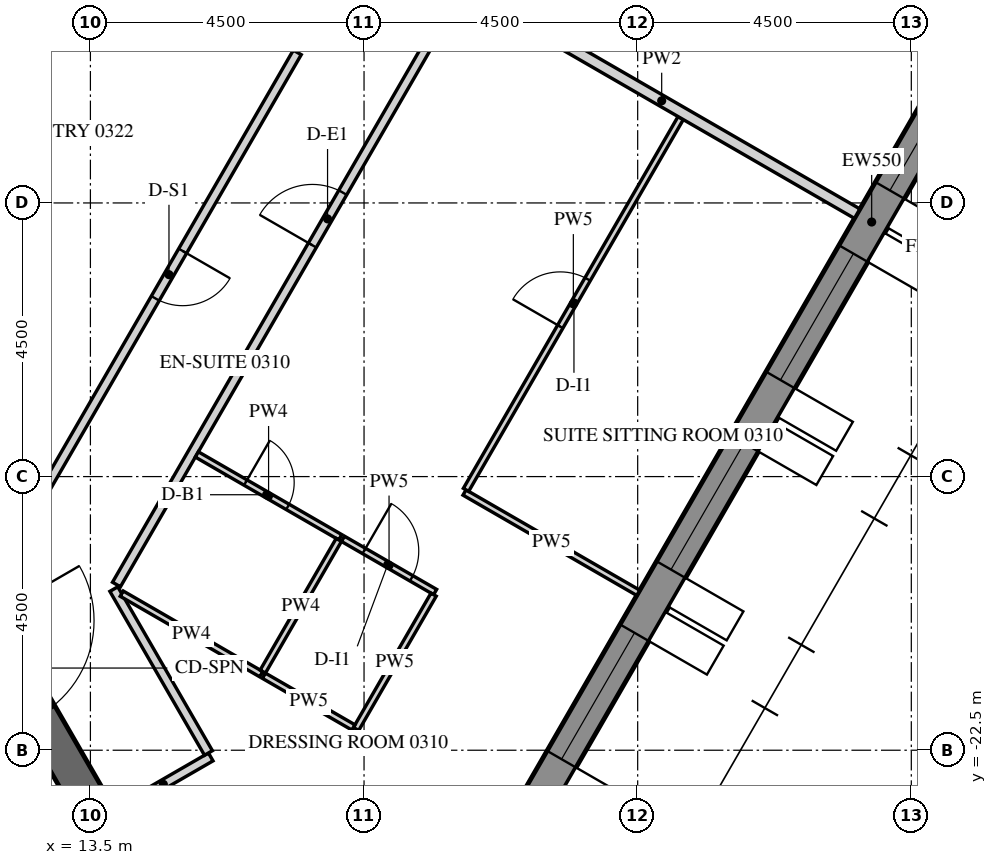
"""IFC4 building model, lengths in metres.
Left out: names, types, materials, properties, quantities, classifications, styles, units other than length and angle.
Written with IfcOpenShell. Run it as: python <this file> out.ifc"""

import sys

from ifc_helpers import new_model, si_unit, direction, frame, frame_2d, origin, place, context, subcontext, project, spatial, polyline, rectangle, outline, extrude, element, fill, save


model = new_model("IFC4")
c1 = context("Model", 3, precision=1e-05, world=origin(), true_north=direction((0.0, 1.0)))
c2 = subcontext(c1, "Body", "Model", "MODEL_VIEW")
j1 = project(units=[si_unit("LENGTHUNIT", "METRE"), si_unit("PLANEANGLEUNIT", "RADIAN")], contexts=[c1])
p1 = place(None, origin())
s1 = spatial("IfcSite", under=j1, at=p1, CompositionType="ELEMENT")
p2 = place(p1, origin())
s2 = spatial("IfcBuilding", under=s1, at=p2, CompositionType="ELEMENT")
p3 = place(p2, frame((0.0, 0.0, 60.9)))
s3 = spatial("IfcBuildingStorey", under=s2, at=p3, CompositionType="ELEMENT", Elevation=60.9)
p4 = place(p3, frame((18.83, -26.835, -0.15), z_axis=(0.0, 0.0, 1.0), x_axis=(0.500003800416, 0.866023209602, 0.0)))
e1 = element("IfcWall", 1, at=p4, inside=s3, PredefinedType="SOLIDWALL", context=c2, shape_type="SweptSolid", body=[
    extrude(outline(polyline([(-0.022, -0.275), (30.097, -0.275), (30.045, 0.275), (0.022, 0.275), (-0.022, -0.275)])), origin(), (0.0, 0.0, 1.0), 3.9),
])
p5 = place(p4, frame((1.236, 0.0, 1.05)))
e2 = element("IfcOpeningElement", 2, at=p5, cuts=e1, PredefinedType="OPENING", context=c2, shape_type="SweptSolid", body=[
    extrude(rectangle(XDim=2.4, YDim=2.4, at=frame_2d((1.2, 1.2))), frame((0.0, 0.285, 0.0), z_axis=(0.0, -1.0, 0.0), x_axis=(1.0, 0.0, 0.0)), (0.0, 0.0, 1.0), 0.57),
])
p6 = place(p4, frame((4.835, 0.0, 1.05)))
e3 = element("IfcOpeningElement", 3, at=p6, cuts=e1, PredefinedType="OPENING", context=c2, shape_type="SweptSolid", body=[
    extrude(rectangle(XDim=2.4, YDim=2.4, at=frame_2d((1.2, 1.2))), frame((0.0, 0.285, 0.0), z_axis=(0.0, -1.0, 0.0), x_axis=(1.0, 0.0, 0.0)), (0.0, 0.0, 1.0), 0.57),
])
p7 = place(p4, frame((8.436, 0.0, 1.05)))
e4 = element("IfcOpeningElement", 4, at=p7, cuts=e1, PredefinedType="OPENING", context=c2, shape_type="SweptSolid", body=[
    extrude(rectangle(XDim=2.4, YDim=2.4, at=frame_2d((1.2, 1.2))), frame((0.0, 0.285, 0.0), z_axis=(0.0, -1.0, 0.0), x_axis=(1.0, 0.0, 0.0)), (0.0, 0.0, 1.0), 0.57),
])
p8 = place(p4, frame((12.035, 0.0, 1.05)))
e5 = element("IfcOpeningElement", 5, at=p8, cuts=e1, PredefinedType="OPENING", context=c2, shape_type="SweptSolid", body=[
    extrude(rectangle(XDim=2.4, YDim=2.4, at=frame_2d((1.2, 1.2))), frame((0.0, 0.285, 0.0), z_axis=(0.0, -1.0, 0.0), x_axis=(1.0, 0.0, 0.0)), (0.0, 0.0, 1.0), 0.57),
])
p9 = place(p4, frame((15.635, 0.0, 1.05)))
e6 = element("IfcOpeningElement", 6, at=p9, cuts=e1, PredefinedType="OPENING", context=c2, shape_type="SweptSolid", body=[
    extrude(rectangle(XDim=2.4, YDim=2.4, at=frame_2d((1.2, 1.2))), frame((0.0, 0.285, 0.0), z_axis=(0.0, -1.0, 0.0), x_axis=(1.0, 0.0, 0.0)), (0.0, 0.0, 1.0), 0.57),
])
p10 = place(p4, frame((19.236, 0.0, 1.05)))
e7 = element("IfcOpeningElement", 7, at=p10, cuts=e1, PredefinedType="OPENING", context=c2, shape_type="SweptSolid", body=[
    extrude(rectangle(XDim=2.4, YDim=2.4, at=frame_2d((1.2, 1.2))), frame((0.0, 0.285, 0.0), z_axis=(0.0, -1.0, 0.0), x_axis=(1.0, 0.0, 0.0)), (0.0, 0.0, 1.0), 0.57),
])
p11 = place(p4, frame((22.835, 0.0, 1.05)))
e8 = element("IfcOpeningElement", 8, at=p11, cuts=e1, PredefinedType="OPENING", context=c2, shape_type="SweptSolid", body=[
    extrude(rectangle(XDim=2.4, YDim=2.4, at=frame_2d((1.2, 1.2))), frame((0.0, 0.285, 0.0), z_axis=(0.0, -1.0, 0.0), x_axis=(1.0, 0.0, 0.0)), (0.0, 0.0, 1.0), 0.57),
])
p12 = place(p4, frame((26.436, 0.0, 1.05)))
e9 = element("IfcOpeningElement", 9, at=p12, cuts=e1, PredefinedType="OPENING", context=c2, shape_type="SweptSolid", body=[
    extrude(rectangle(XDim=2.4, YDim=2.4, at=frame_2d((1.2, 1.2))), frame((0.0, 0.285, 0.0), z_axis=(0.0, -1.0, 0.0), x_axis=(1.0, 0.0, 0.0)), (0.0, 0.0, 1.0), 0.57),
])
p13 = place(p3, frame((7.91, -13.7, -0.15), z_axis=(0.0, 0.0, 1.0), x_axis=(0.499999880136, 0.866025472988, 0.0)))
e10 = element("IfcWall", 10, at=p13, inside=s3, PredefinedType="SHEAR", context=c2, shape_type="SweptSolid", body=[
    extrude(outline(polyline([(-0.173, -0.3), (15.993, -0.3), (15.646, 0.3), (0.173, 0.3), (-0.173, -0.3)])), origin(), (0.0, 0.0, 1.0), 3.9),
])
p14 = place(p13, frame((7.039, 0.0, 0.15)))
e11 = element("IfcOpeningElement", 11, at=p14, cuts=e10, PredefinedType="OPENING", context=c2, shape_type="SweptSolid", body=[
    extrude(rectangle(XDim=1.8, YDim=2.4, at=frame_2d((0.9, 1.2))), frame((0.0, 0.31, 0.0), z_axis=(0.0, -1.0, 0.0), x_axis=(1.0, 0.0, 0.0)), (0.0, 0.0, 1.0), 0.62),
])
p15 = place(p3, frame((8.083, -14.0, -0.15), z_axis=(0.0, 0.0, 1.0), x_axis=(0.499997680643, -0.866026742862, 0.0)))
e12 = element("IfcWall", 12, at=p15, inside=s3, PredefinedType="SHEAR", context=c2, shape_type="SweptSolid", body=[
    extrude(rectangle(XDim=16.509, YDim=0.6, at=frame_2d((8.254, 0.0))), origin(), (0.0, 0.0, 1.0), 3.9),
])
p16 = place(p15, frame((7.354, 0.0, 0.15)))
e13 = element("IfcOpeningElement", 13, at=p16, cuts=e12, PredefinedType="OPENING", context=c2, shape_type="SweptSolid", body=[
    extrude(rectangle(XDim=1.8, YDim=2.4, at=frame_2d((0.9, 1.2))), frame((0.0, 0.31, 0.0), z_axis=(0.0, -1.0, 0.0), x_axis=(1.0, 0.0, 0.0)), (0.0, 0.0, 1.0), 0.62),
])
p17 = place(p3, frame((13.92, -23.51, 0.0), z_axis=(0.0, 0.0, 1.0), x_axis=(0.866047807691, 0.499961193289, 0.0)))
e14 = element("IfcWall", 14, at=p17, inside=s3, PredefinedType="PARTITIONING", context=c2, shape_type="SweptSolid", body=[
    extrude(rectangle(XDim=1.8, YDim=0.15, at=frame_2d((0.9, 0.0))), origin(), (0.0, 0.0, 1.0), 2.988),
])
p18 = place(p3, frame((15.441, -22.545, 0.0), z_axis=(0.0, 0.0, 1.0), x_axis=(-0.500037089193, 0.86600398927, 0.0)))
e15 = element("IfcWall", 15, at=p18, inside=s3, PredefinedType="PARTITIONING", context=c2, shape_type="SweptSolid", body=[
    extrude(rectangle(XDim=3.112, YDim=0.15, at=frame_2d((1.556, 0.0))), origin(), (0.0, 0.0, 1.0), 2.988),
])
p19 = place(p3, frame((13.928, -19.775, 0.0), z_axis=(0.0, 0.0, 1.0), x_axis=(0.50000450071, 0.866022805283, 0.0)))
e16 = element("IfcWall", 16, at=p19, inside=s3, PredefinedType="PARTITIONING", context=c2, shape_type="SweptSolid", body=[
    extrude(rectangle(XDim=23.877, YDim=0.15, at=frame_2d((11.938, 0.0))), origin(), (0.0, 0.0, 1.0), 2.988),
])
p20 = place(p19, frame((6.443, 0.0, 0.0)))
e17 = element("IfcOpeningElement", 17, at=p20, cuts=e16, PredefinedType="OPENING", context=c2, shape_type="SweptSolid", body=[
    extrude(rectangle(XDim=1.0, YDim=2.1, at=frame_2d((0.5, 1.05))), frame((0.0, 0.085, 0.0), z_axis=(0.0, -1.0, 0.0), x_axis=(1.0, 0.0, 0.0)), (0.0, 0.0, 1.0), 0.17),
])
p21 = place(p19, frame((14.972, 0.0, 0.0)))
e18 = element("IfcOpeningElement", 18, at=p21, cuts=e16, PredefinedType="OPENING", context=c2, shape_type="SweptSolid", body=[
    extrude(rectangle(XDim=1.0, YDim=2.1, at=frame_2d((0.5, 1.05))), frame((0.0, 0.085, 0.0), z_axis=(0.0, -1.0, 0.0), x_axis=(1.0, 0.0, 0.0)), (0.0, 0.0, 1.0), 0.17),
])
p22 = place(p3, frame((16.902, -11.024, 0.0), z_axis=(0.0, 0.0, 1.0), x_axis=(-0.499999527968, -0.866025676312, 0.0)))
e19 = element("IfcWall", 19, at=p22, inside=s3, PredefinedType="PARTITIONING", context=c2, shape_type="SweptSolid", body=[
    extrude(rectangle(XDim=8.441, YDim=0.15, at=frame_2d((4.22, 0.0))), origin(), (0.0, 0.0, 1.0), 2.988),
])
p23 = place(p22, frame((3.771, 0.0, 0.0)))
e20 = element("IfcOpeningElement", 20, at=p23, cuts=e19, PredefinedType="OPENING", context=c2, shape_type="SweptSolid", body=[
    extrude(rectangle(XDim=0.9, YDim=2.1, at=frame_2d((0.45, 1.05))), frame((0.0, 0.085, 0.0), z_axis=(0.0, -1.0, 0.0), x_axis=(1.0, 0.0, 0.0)), (0.0, 0.0, 1.0), 0.17),
])
p24 = place(p3, frame((16.31, -21.25, 0.0), z_axis=(0.0, 0.0, 1.0), x_axis=(-0.866029095148, 0.499993606316, 0.0)))
e21 = element("IfcWall", 21, at=p24, inside=s3, PredefinedType="PARTITIONING", context=c2, shape_type="SweptSolid", body=[
    extrude(rectangle(XDim=2.65, YDim=0.1, at=frame_2d((1.325, 0.0))), origin(), (0.0, 0.0, 1.0), 2.988),
])
p25 = place(p3, frame((15.25, -17.636, 0.0), z_axis=(0.0, 0.0, 1.0), x_axis=(0.866012511928, -0.500022328685, 0.0)))
e22 = element("IfcWall", 22, at=p25, inside=s3, PredefinedType="PARTITIONING", context=c2, shape_type="SweptSolid", body=[
    extrude(rectangle(XDim=2.725, YDim=0.1, at=frame_2d((1.363, 0.0))), origin(), (0.0, 0.0, 1.0), 2.988),
])
p26 = place(p25, frame((0.925, 0.0, 0.0)))
e23 = element("IfcOpeningElement", 23, at=p26, cuts=e22, PredefinedType="OPENING", context=c2, shape_type="SweptSolid", body=[
    extrude(rectangle(XDim=0.8, YDim=2.1, at=frame_2d((0.4, 1.05))), frame((0.0, 0.06, 0.0), z_axis=(0.0, -1.0, 0.0), x_axis=(1.0, 0.0, 0.0)), (0.0, 0.0, 1.0), 0.12),
])
p27 = place(p3, frame((17.654, -19.023, 0.0), z_axis=(0.0, 0.0, 1.0), x_axis=(0.866002029911, -0.500040482552, 0.0)))
e24 = element("IfcWall", 24, at=p27, inside=s3, PredefinedType="PARTITIONING", context=c2, shape_type="SweptSolid", body=[
    extrude(rectangle(XDim=1.75, YDim=0.1, at=frame_2d((0.875, 0.0))), origin(), (0.0, 0.0, 1.0), 2.988),
])
p28 = place(p27, frame((0.4, 0.0, 0.0)))
e25 = element("IfcOpeningElement", 25, at=p28, cuts=e24, PredefinedType="OPENING", context=c2, shape_type="SweptSolid", body=[
    extrude(rectangle(XDim=0.9, YDim=2.1, at=frame_2d((0.45, 1.05))), frame((0.0, 0.06, 0.0), z_axis=(0.0, -1.0, 0.0), x_axis=(1.0, 0.0, 0.0)), (0.0, 0.0, 1.0), 0.12),
])
p29 = place(p3, frame((19.144, -19.942, 0.0), z_axis=(0.0, 0.0, 1.0), x_axis=(-0.500062241894, -0.865989465428, 0.0)))
e26 = element("IfcWall", 26, at=p29, inside=s3, PredefinedType="PARTITIONING", context=c2, shape_type="SweptSolid", body=[
    extrude(rectangle(XDim=2.55, YDim=0.1, at=frame_2d((1.275, 0.0))), origin(), (0.0, 0.0, 1.0), 2.988),
])
p30 = place(p3, frame((17.826, -22.125, 0.0), z_axis=(0.0, 0.0, 1.0), x_axis=(-0.865989465428, 0.500062241894, 0.0)))
e27 = element("IfcWall", 27, at=p30, inside=s3, PredefinedType="PARTITIONING", context=c2, shape_type="SweptSolid", body=[
    extrude(rectangle(XDim=1.7, YDim=0.1, at=frame_2d((0.85, 0.0))), origin(), (0.0, 0.0, 1.0), 2.988),
])
p31 = place(p3, frame((22.51, -19.912, 0.0), z_axis=(0.0, 0.0, 1.0), x_axis=(-0.866008176907, 0.50002983664, 0.0)))
e28 = element("IfcWall", 28, at=p31, inside=s3, PredefinedType="PARTITIONING", context=c2, shape_type="SweptSolid", body=[
    extrude(rectangle(XDim=3.3, YDim=0.1, at=frame_2d((1.65, 0.0))), origin(), (0.0, 0.0, 1.0), 2.988),
])
p32 = place(p3, frame((19.677, -18.218, 0.0), z_axis=(0.0, 0.0, 1.0), x_axis=(0.500010820671, 0.866019156377, 0.0)))
e29 = element("IfcWall", 29, at=p32, inside=s3, PredefinedType="PARTITIONING", context=c2, shape_type="SweptSolid", body=[
    extrude(rectangle(XDim=7.06, YDim=0.1, at=frame_2d((3.53, 0.0))), origin(), (0.0, 0.0, 1.0), 2.988),
])
p33 = place(p32, frame((3.1, 0.0, 0.0)))
e30 = element("IfcOpeningElement", 30, at=p33, cuts=e29, PredefinedType="OPENING", context=c2, shape_type="SweptSolid", body=[
    extrude(rectangle(XDim=0.9, YDim=2.1, at=frame_2d((0.45, 1.05))), frame((0.0, 0.06, 0.0), z_axis=(0.0, -1.0, 0.0), x_axis=(1.0, 0.0, 0.0)), (0.0, 0.0, 1.0), 0.12),
])
p34 = place(p3, frame((26.11, -13.676, 0.0), z_axis=(0.0, 0.0, 1.0), x_axis=(-0.866014745021, 0.500018461065, 0.0)))
e31 = element("IfcWall", 31, at=p34, inside=s3, PredefinedType="PARTITIONING", context=c2, shape_type="SweptSolid", body=[
    extrude(rectangle(XDim=7.425, YDim=0.18, at=frame_2d((3.712, 0.0))), origin(), (0.0, 0.0, 1.0), 2.988),
])
p35 = place(p3, frame((16.335, -21.207, 0.0), z_axis=(0.0, 0.0, 1.0), x_axis=(0.500004234368, 0.866022959057, 0.0)))
e32 = element("IfcWall", 32, at=p35, inside=s3, PredefinedType="PARTITIONING", context=c2, shape_type="SweptSolid", body=[
    extrude(rectangle(XDim=2.5, YDim=0.1, at=frame_2d((1.25, 0.0))), origin(), (0.0, 0.0, 1.0), 2.988),
])
p36 = place(p6, frame((0.0, 0.205, 0.0)))
e33 = element("IfcWindow", 33, at=p36, inside=s3, PartitioningType="DOUBLE_PANEL_VERTICAL", PredefinedType="WINDOW", context=c2, shape_type="SweptSolid", body=[
    extrude(rectangle(XDim=2.4, YDim=2.4, at=frame_2d((1.2, 1.2))), frame((0.0, 0.03, 0.0), z_axis=(0.0, -1.0, 0.0), x_axis=(1.0, 0.0, 0.0)), (0.0, 0.0, 1.0), 0.06),
])
fill(e3, e33)
p37 = place(p7, frame((0.0, 0.205, 0.0)))
e34 = element("IfcWindow", 34, at=p37, inside=s3, PartitioningType="DOUBLE_PANEL_VERTICAL", PredefinedType="WINDOW", context=c2, shape_type="SweptSolid", body=[
    extrude(rectangle(XDim=2.4, YDim=2.4, at=frame_2d((1.2, 1.2))), frame((0.0, 0.03, 0.0), z_axis=(0.0, -1.0, 0.0), x_axis=(1.0, 0.0, 0.0)), (0.0, 0.0, 1.0), 0.06),
])
fill(e4, e34)
p38 = place(p8, frame((0.0, 0.205, 0.0)))
e35 = element("IfcWindow", 35, at=p38, inside=s3, PartitioningType="DOUBLE_PANEL_VERTICAL", PredefinedType="WINDOW", context=c2, shape_type="SweptSolid", body=[
    extrude(rectangle(XDim=2.4, YDim=2.4, at=frame_2d((1.2, 1.2))), frame((0.0, 0.03, 0.0), z_axis=(0.0, -1.0, 0.0), x_axis=(1.0, 0.0, 0.0)), (0.0, 0.0, 1.0), 0.06),
])
fill(e5, e35)
p39 = place(p9, frame((0.0, 0.205, 0.0)))
e36 = element("IfcWindow", 36, at=p39, inside=s3, PartitioningType="DOUBLE_PANEL_VERTICAL", PredefinedType="WINDOW", context=c2, shape_type="SweptSolid", body=[
    extrude(rectangle(XDim=2.4, YDim=2.4, at=frame_2d((1.2, 1.2))), frame((0.0, 0.03, 0.0), z_axis=(0.0, -1.0, 0.0), x_axis=(1.0, 0.0, 0.0)), (0.0, 0.0, 1.0), 0.06),
])
fill(e6, e36)
p40 = place(p20, origin())
e37 = element("IfcDoor", 37, at=p40, inside=s3, OperationType="SINGLE_SWING_RIGHT", PredefinedType="DOOR", context=c2, shape_type="SweptSolid", body=[
    extrude(rectangle(XDim=1.0, YDim=2.1, at=frame_2d((0.5, 1.05))), frame((0.0, 0.025, 0.0), z_axis=(0.0, -1.0, 0.0), x_axis=(1.0, 0.0, 0.0)), (0.0, 0.0, 1.0), 0.05),
])
fill(e17, e37)
p41 = place(p26, origin())
e38 = element("IfcDoor", 38, at=p41, inside=s3, OperationType="SINGLE_SWING_RIGHT", PredefinedType="DOOR", context=c2, shape_type="SweptSolid", body=[
    extrude(rectangle(XDim=0.8, YDim=2.1, at=frame_2d((0.4, 1.05))), frame((0.0, 0.025, 0.0), z_axis=(0.0, -1.0, 0.0), x_axis=(1.0, 0.0, 0.0)), (0.0, 0.0, 1.0), 0.05),
])
fill(e23, e38)
p42 = place(p28, origin())
e39 = element("IfcDoor", 39, at=p42, inside=s3, OperationType="SINGLE_SWING_RIGHT", PredefinedType="DOOR", context=c2, shape_type="SweptSolid", body=[
    extrude(rectangle(XDim=0.9, YDim=2.1, at=frame_2d((0.45, 1.05))), frame((0.0, 0.025, 0.0), z_axis=(0.0, -1.0, 0.0), x_axis=(1.0, 0.0, 0.0)), (0.0, 0.0, 1.0), 0.05),
])
fill(e25, e39)
p43 = place(p33, origin())
e40 = element("IfcDoor", 40, at=p43, inside=s3, OperationType="SINGLE_SWING_LEFT", PredefinedType="DOOR", context=c2, shape_type="SweptSolid", body=[
    extrude(rectangle(XDim=0.9, YDim=2.1, at=frame_2d((0.45, 1.05))), frame((0.0, 0.025, 0.0), z_axis=(0.0, -1.0, 0.0), x_axis=(1.0, 0.0, 0.0)), (0.0, 0.0, 1.0), 0.05),
])
fill(e30, e40)
p44 = place(p23, origin())
e41 = element("IfcDoor", 41, at=p44, inside=s3, OperationType="SINGLE_SWING_RIGHT", PredefinedType="DOOR", context=c2, shape_type="SweptSolid", body=[
    extrude(rectangle(XDim=0.9, YDim=2.1, at=frame_2d((0.45, 1.05))), frame((0.0, 0.025, 0.0), z_axis=(0.0, -1.0, 0.0), x_axis=(1.0, 0.0, 0.0)), (0.0, 0.0, 1.0), 0.05),
])
fill(e20, e41)
save(model, sys.argv[1])
